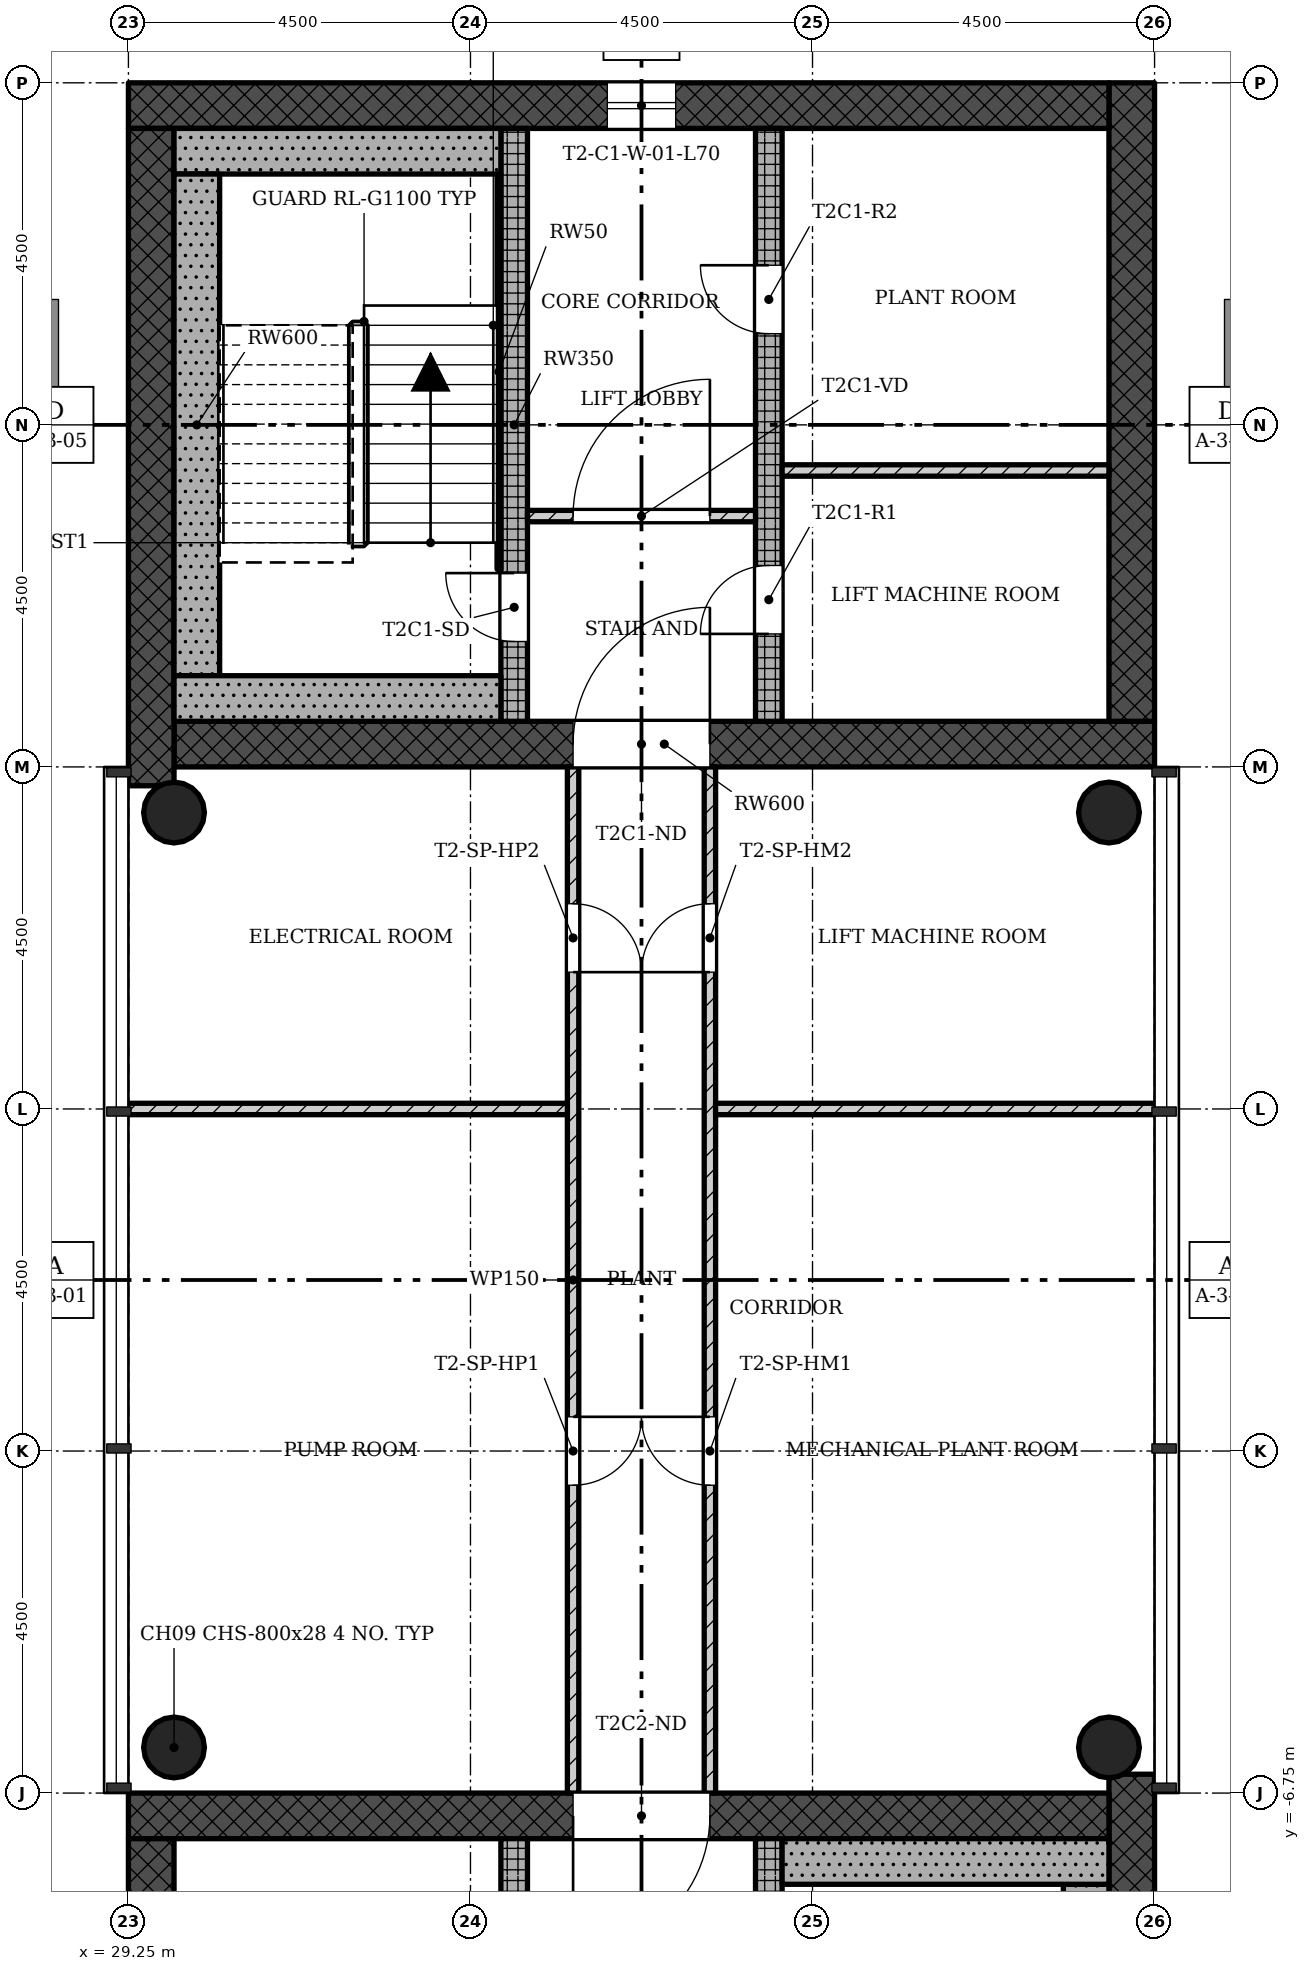
"""IFC4 building model, lengths in metres.
Left out: names, types, materials, properties, quantities, classifications, styles, units other than length and angle.
Written with IfcOpenShell. Run it as: python <this file> out.ifc"""

import sys

from ifc_helpers import new_model, si_unit, direction, frame, frame_2d, origin, origin_2d, place, context, subcontext, project, spatial, rectangle, hollow_circle, extrude, element, fill, save


model = new_model("IFC4")
c1 = context("Model", 3, precision=1e-05, world=origin(), true_north=direction((0.0, 1.0)))
c2 = subcontext(c1, "Body", "Model", "MODEL_VIEW")
j1 = project(units=[si_unit("LENGTHUNIT", "METRE"), si_unit("PLANEANGLEUNIT", "RADIAN")], contexts=[c1])
p1 = place(None, origin())
s1 = spatial("IfcSite", under=j1, at=p1, CompositionType="ELEMENT")
p2 = place(p1, origin())
s2 = spatial("IfcBuilding", under=s1, at=p2, CompositionType="ELEMENT")
p3 = place(p2, frame((0.0, 0.0, 255.9)))
s3 = spatial("IfcBuildingStorey", under=s2, at=p3, CompositionType="ELEMENT", Elevation=255.9)
p4 = place(p3, frame((29.85, 7.05, 0.0), z_axis=(0.0, 0.0, 1.0), x_axis=(1.0, 0.0, 0.0)))
e1 = element("IfcWall", 1, at=p4, inside=s3, PredefinedType="SHEAR", context=c2, shape_type="SweptSolid", body=[
    extrude(rectangle(XDim=12.9, YDim=0.6, at=frame_2d((6.45, 0.0))), origin(), (0.0, 0.0, 1.0), 4.5),
])
p5 = place(p4, frame((5.25, 0.0, 0.0)))
e2 = element("IfcOpeningElement", 2, at=p5, cuts=e1, PredefinedType="OPENING", context=c2, shape_type="SweptSolid", body=[
    extrude(rectangle(XDim=1.8, YDim=2.1, at=frame_2d((0.9, 1.05))), frame((0.0, 0.31, 0.0), z_axis=(0.0, -1.0, 0.0), x_axis=(1.0, 0.0, 0.0)), (0.0, 0.0, 1.0), 0.62),
])
p6 = place(p3, frame((42.45, 7.35, 0.0), z_axis=(0.0, 0.0, 1.0), x_axis=(0.0, 1.0, 0.0)))
e3 = element("IfcWall", 3, at=p6, inside=s3, PredefinedType="SHEAR", context=c2, shape_type="SweptSolid", body=[
    extrude(rectangle(XDim=8.4, YDim=0.6, at=frame_2d((4.2, 0.0))), origin(), (0.0, 0.0, 1.0), 4.5),
])
p7 = place(p3, frame((42.15, 15.45, 0.0), z_axis=(0.0, 0.0, 1.0), x_axis=(-1.0, 0.0, 0.0)))
e4 = element("IfcWall", 4, at=p7, inside=s3, PredefinedType="SHEAR", context=c2, shape_type="SweptSolid", body=[
    extrude(rectangle(XDim=12.9, YDim=0.6, at=frame_2d((6.45, 0.0))), origin(), (0.0, 0.0, 1.0), 4.5),
])
p8 = place(p7, frame((5.7, 0.0, 0.45)))
e5 = element("IfcOpeningElement", 5, at=p8, cuts=e4, PredefinedType="OPENING", context=c2, shape_type="SweptSolid", body=[
    extrude(rectangle(XDim=0.9, YDim=2.4, at=frame_2d((0.45, 1.2))), frame((0.0, 0.31, 0.0), z_axis=(0.0, -1.0, 0.0), x_axis=(1.0, 0.0, 0.0)), (0.0, 0.0, 1.0), 0.62),
])
p9 = place(p3, frame((29.55, 15.15, 0.0), z_axis=(0.0, 0.0, 1.0), x_axis=(0.0, -1.0, 0.0)))
e6 = element("IfcWall", 6, at=p9, inside=s3, PredefinedType="SHEAR", context=c2, shape_type="SweptSolid", body=[
    extrude(rectangle(XDim=8.648, YDim=0.6, at=frame_2d((4.324, 0.0))), origin(), (0.0, 0.0, 1.0), 4.5),
])
p10 = place(p3, frame((34.325, 7.35, 0.0), z_axis=(0.0, 0.0, 1.0), x_axis=(0.0, 1.0, 0.0)))
e7 = element("IfcWall", 7, at=p10, inside=s3, PredefinedType="SHEAR", context=c2, shape_type="SweptSolid", body=[
    extrude(rectangle(XDim=7.8, YDim=0.35, at=frame_2d((3.9, 0.0))), origin(), (0.0, 0.0, 1.0), 4.5),
])
p11 = place(p10, frame((1.05, 0.0, 0.0)))
e8 = element("IfcOpeningElement", 8, at=p11, cuts=e7, PredefinedType="OPENING", context=c2, shape_type="SweptSolid", body=[
    extrude(rectangle(XDim=0.9, YDim=2.1, at=frame_2d((0.45, 1.05))), frame((0.0, 0.185, 0.0), z_axis=(0.0, -1.0, 0.0), x_axis=(1.0, 0.0, 0.0)), (0.0, 0.0, 1.0), 0.37),
])
p12 = place(p3, frame((37.675, 7.35, 0.0), z_axis=(0.0, 0.0, 1.0), x_axis=(0.0, 1.0, 0.0)))
e9 = element("IfcWall", 9, at=p12, inside=s3, PredefinedType="SHEAR", context=c2, shape_type="SweptSolid", body=[
    extrude(rectangle(XDim=7.8, YDim=0.35, at=frame_2d((3.9, 0.0))), origin(), (0.0, 0.0, 1.0), 4.5),
])
p13 = place(p12, frame((1.15, 0.0, 0.0)))
e10 = element("IfcOpeningElement", 10, at=p13, cuts=e9, PredefinedType="OPENING", context=c2, shape_type="SweptSolid", body=[
    extrude(rectangle(XDim=0.9, YDim=2.1, at=frame_2d((0.45, 1.05))), frame((0.0, 0.185, 0.0), z_axis=(0.0, -1.0, 0.0), x_axis=(1.0, 0.0, 0.0)), (0.0, 0.0, 1.0), 0.37),
])
p14 = place(p12, frame((5.1, 0.0, 0.0)))
e11 = element("IfcOpeningElement", 11, at=p14, cuts=e9, PredefinedType="OPENING", context=c2, shape_type="SweptSolid", body=[
    extrude(rectangle(XDim=0.9, YDim=2.1, at=frame_2d((0.45, 1.05))), frame((0.0, 0.185, 0.0), z_axis=(0.0, -1.0, 0.0), x_axis=(1.0, 0.0, 0.0)), (0.0, 0.0, 1.0), 0.37),
])
p15 = place(p3, frame((42.45, -15.15, 0.0), z_axis=(0.0, 0.0, 1.0), x_axis=(0.0, 1.0, 0.0)))
e12 = element("IfcWall", 12, at=p15, inside=s3, PredefinedType="SHEAR", context=c2, shape_type="SweptSolid", body=[
    extrude(rectangle(XDim=8.648, YDim=0.6, at=frame_2d((4.324, 0.0))), origin(), (0.0, 0.0, 1.0), 4.5),
])
p16 = place(p3, frame((42.15, -7.05, 0.0), z_axis=(0.0, 0.0, 1.0), x_axis=(-1.0, 0.0, 0.0)))
e13 = element("IfcWall", 13, at=p16, inside=s3, PredefinedType="SHEAR", context=c2, shape_type="SweptSolid", body=[
    extrude(rectangle(XDim=12.9, YDim=0.6, at=frame_2d((6.45, 0.0))), origin(), (0.0, 0.0, 1.0), 4.5),
])
p17 = place(p16, frame((5.25, 0.0, 0.0)))
e14 = element("IfcOpeningElement", 14, at=p17, cuts=e13, PredefinedType="OPENING", context=c2, shape_type="SweptSolid", body=[
    extrude(rectangle(XDim=1.8, YDim=2.1, at=frame_2d((0.9, 1.05))), frame((0.0, 0.31, 0.0), z_axis=(0.0, -1.0, 0.0), x_axis=(1.0, 0.0, 0.0)), (0.0, 0.0, 1.0), 0.62),
])
p18 = place(p3, frame((29.55, -7.35, 0.0), z_axis=(0.0, 0.0, 1.0), x_axis=(0.0, -1.0, 0.0)))
e15 = element("IfcWall", 15, at=p18, inside=s3, PredefinedType="SHEAR", context=c2, shape_type="SweptSolid", body=[
    extrude(rectangle(XDim=8.4, YDim=0.6, at=frame_2d((4.2, 0.0))), origin(), (0.0, 0.0, 1.0), 4.5),
])
p19 = place(p3, frame((34.325, -15.15, 0.0), z_axis=(0.0, 0.0, 1.0), x_axis=(0.0, 1.0, 0.0)))
e16 = element("IfcWall", 16, at=p19, inside=s3, PredefinedType="SHEAR", context=c2, shape_type="SweptSolid", body=[
    extrude(rectangle(XDim=7.8, YDim=0.35, at=frame_2d((3.9, 0.0))), origin(), (0.0, 0.0, 1.0), 4.5),
])
p20 = place(p19, frame((5.55, 0.0, 0.0)))
e17 = element("IfcOpeningElement", 17, at=p20, cuts=e16, PredefinedType="OPENING", context=c2, shape_type="SweptSolid", body=[
    extrude(rectangle(XDim=1.1, YDim=2.1, at=frame_2d((0.55, 1.05))), frame((0.0, 0.185, 0.0), z_axis=(0.0, -1.0, 0.0), x_axis=(1.0, 0.0, 0.0)), (0.0, 0.0, 1.0), 0.37),
])
p21 = place(p19, frame((3.95, 0.0, 0.0)))
e18 = element("IfcOpeningElement", 18, at=p21, cuts=e16, PredefinedType="OPENING", context=c2, shape_type="SweptSolid", body=[
    extrude(rectangle(XDim=0.9, YDim=2.1, at=frame_2d((0.45, 1.05))), frame((0.0, 0.185, 0.0), z_axis=(0.0, -1.0, 0.0), x_axis=(1.0, 0.0, 0.0)), (0.0, 0.0, 1.0), 0.37),
])
p22 = place(p19, frame((2.75, 0.0, 0.0)))
e19 = element("IfcOpeningElement", 19, at=p22, cuts=e16, PredefinedType="OPENING", context=c2, shape_type="SweptSolid", body=[
    extrude(rectangle(XDim=0.9, YDim=2.1, at=frame_2d((0.45, 1.05))), frame((0.0, 0.185, 0.0), z_axis=(0.0, -1.0, 0.0), x_axis=(1.0, 0.0, 0.0)), (0.0, 0.0, 1.0), 0.37),
])
p23 = place(p19, frame((0.85, 0.0, 0.0)))
e20 = element("IfcOpeningElement", 20, at=p23, cuts=e16, PredefinedType="OPENING", context=c2, shape_type="SweptSolid", body=[
    extrude(rectangle(XDim=0.9, YDim=2.1, at=frame_2d((0.45, 1.05))), frame((0.0, 0.185, 0.0), z_axis=(0.0, -1.0, 0.0), x_axis=(1.0, 0.0, 0.0)), (0.0, 0.0, 1.0), 0.37),
])
p24 = place(p3, frame((37.675, -15.15, 0.0), z_axis=(0.0, 0.0, 1.0), x_axis=(0.0, 1.0, 0.0)))
e21 = element("IfcWall", 21, at=p24, inside=s3, PredefinedType="SHEAR", context=c2, shape_type="SweptSolid", body=[
    extrude(rectangle(XDim=7.8, YDim=0.35, at=frame_2d((3.9, 0.0))), origin(), (0.0, 0.0, 1.0), 4.5),
])
p25 = place(p24, frame((5.85, 0.0, 0.0)))
e22 = element("IfcOpeningElement", 22, at=p25, cuts=e21, PredefinedType="OPENING", context=c2, shape_type="SweptSolid", body=[
    extrude(rectangle(XDim=0.9, YDim=2.1, at=frame_2d((0.45, 1.05))), frame((0.0, 0.185, 0.0), z_axis=(0.0, -1.0, 0.0), x_axis=(1.0, 0.0, 0.0)), (0.0, 0.0, 1.0), 0.37),
])
for number, where, z_axis, x_axis in (
    (23, (42.15, -6.15, 0.0), (0.0, 0.0, 1.0), (1.0, 0.0, 0.0)),
    (24, (42.15, 6.15, 0.0), (0.0, 0.0, 1.0), (1.0, 0.0, 0.0)),
    (25, (29.85, 6.15, 0.0), (0.0, 0.0, 1.0), (1.0, 0.0, 0.0)),
    (26, (29.85, -6.15, 0.0), (0.0, 0.0, 1.0), (1.0, 0.0, 0.0)),
):
    element("IfcColumn", number, at=place(p3, frame(where, z_axis=z_axis, x_axis=x_axis)), inside=s3, PredefinedType="COLUMN", context=c2, shape_type="SweptSolid", body=[
        extrude(hollow_circle(Radius=0.4, WallThickness=0.028, at=origin_2d()), origin(), (0.0, 0.0, 1.0), 4.5),
    ])
p26 = place(p3, frame((37.5, 10.05, 0.0), z_axis=(0.0, 0.0, 1.0), x_axis=(-1.0, 0.0, 0.0)))
e27 = element("IfcWall", 27, at=p26, inside=s3, PredefinedType="PARTITIONING", context=c2, shape_type="SweptSolid", body=[
    extrude(rectangle(XDim=3.0, YDim=0.15, at=frame_2d((1.5, 0.0))), origin(), (0.0, 0.0, 1.0), 4.1),
])
p27 = place(p26, frame((0.6, 0.0, 0.0)))
e28 = element("IfcOpeningElement", 28, at=p27, cuts=e27, PredefinedType="OPENING", context=c2, shape_type="SweptSolid", body=[
    extrude(rectangle(XDim=1.8, YDim=2.1, at=frame_2d((0.9, 1.05))), frame((0.0, 0.085, 0.0), z_axis=(0.0, -1.0, 0.0), x_axis=(1.0, 0.0, 0.0)), (0.0, 0.0, 1.0), 0.17),
])
p28 = place(p3, frame((42.15, 10.65, 0.0), z_axis=(0.0, 0.0, 1.0), x_axis=(-1.0, 0.0, 0.0)))
e29 = element("IfcWall", 29, at=p28, inside=s3, PredefinedType="PARTITIONING", context=c2, shape_type="SweptSolid", body=[
    extrude(rectangle(XDim=4.3, YDim=0.15, at=frame_2d((2.15, 0.0))), origin(), (0.0, 0.0, 1.0), 4.1),
])
p29 = place(p3, frame((35.1, -6.75, 0.0), z_axis=(0.0, 0.0, 1.0), x_axis=(0.0, 1.0, 0.0)))
e30 = element("IfcWall", 30, at=p29, inside=s3, PredefinedType="PARTITIONING", context=c2, shape_type="SweptSolid", body=[
    extrude(rectangle(XDim=13.5, YDim=0.15, at=frame_2d((6.75, 0.0))), origin(), (0.0, 0.0, 1.0), 4.1),
])
p30 = place(p29, frame((4.05, 0.0, 0.0)))
e31 = element("IfcOpeningElement", 31, at=p30, cuts=e30, PredefinedType="OPENING", context=c2, shape_type="SweptSolid", body=[
    extrude(rectangle(XDim=0.9, YDim=2.1, at=frame_2d((0.45, 1.05))), frame((0.0, 0.085, 0.0), z_axis=(0.0, -1.0, 0.0), x_axis=(1.0, 0.0, 0.0)), (0.0, 0.0, 1.0), 0.17),
])
p31 = place(p29, frame((10.8, 0.0, 0.0)))
e32 = element("IfcOpeningElement", 32, at=p31, cuts=e30, PredefinedType="OPENING", context=c2, shape_type="SweptSolid", body=[
    extrude(rectangle(XDim=0.9, YDim=2.1, at=frame_2d((0.45, 1.05))), frame((0.0, 0.085, 0.0), z_axis=(0.0, -1.0, 0.0), x_axis=(1.0, 0.0, 0.0)), (0.0, 0.0, 1.0), 0.17),
])
p32 = place(p3, frame((35.025, 2.25, 0.0), z_axis=(0.0, 0.0, 1.0), x_axis=(-1.0, 0.0, 0.0)))
e33 = element("IfcWall", 33, at=p32, inside=s3, PredefinedType="PARTITIONING", context=c2, shape_type="SweptSolid", body=[
    extrude(rectangle(XDim=5.875, YDim=0.15, at=frame_2d((2.938, 0.0))), origin(), (0.0, 0.0, 1.0), 4.1),
])
p33 = place(p3, frame((36.9, -6.75, 0.0), z_axis=(0.0, 0.0, 1.0), x_axis=(0.0, 1.0, 0.0)))
e34 = element("IfcWall", 34, at=p33, inside=s3, PredefinedType="PARTITIONING", context=c2, shape_type="SweptSolid", body=[
    extrude(rectangle(XDim=13.5, YDim=0.15, at=frame_2d((6.75, 0.0))), origin(), (0.0, 0.0, 1.0), 4.1),
])
p34 = place(p33, frame((4.05, 0.0, 0.0)))
e35 = element("IfcOpeningElement", 35, at=p34, cuts=e34, PredefinedType="OPENING", context=c2, shape_type="SweptSolid", body=[
    extrude(rectangle(XDim=0.9, YDim=2.1, at=frame_2d((0.45, 1.05))), frame((0.0, 0.085, 0.0), z_axis=(0.0, -1.0, 0.0), x_axis=(1.0, 0.0, 0.0)), (0.0, 0.0, 1.0), 0.17),
])
p35 = place(p33, frame((10.8, 0.0, 0.0)))
e36 = element("IfcOpeningElement", 36, at=p35, cuts=e34, PredefinedType="OPENING", context=c2, shape_type="SweptSolid", body=[
    extrude(rectangle(XDim=0.9, YDim=2.1, at=frame_2d((0.45, 1.05))), frame((0.0, 0.085, 0.0), z_axis=(0.0, -1.0, 0.0), x_axis=(1.0, 0.0, 0.0)), (0.0, 0.0, 1.0), 0.17),
])
p36 = place(p3, frame((36.975, 2.25, 0.0), z_axis=(0.0, 0.0, 1.0), x_axis=(1.0, 0.0, 0.0)))
e37 = element("IfcWall", 37, at=p36, inside=s3, PredefinedType="PARTITIONING", context=c2, shape_type="SweptSolid", body=[
    extrude(rectangle(XDim=5.875, YDim=0.15, at=frame_2d((2.938, 0.0))), origin(), (0.0, 0.0, 1.0), 4.1),
])
p37 = place(p3, frame((34.15, 14.85, 0.0), z_axis=(0.0, 0.0, 1.0), x_axis=(-1.0, 0.0, 0.0)))
e38 = element("IfcWall", 38, at=p37, inside=s3, PredefinedType="SHEAR", context=c2, shape_type="SweptSolid", body=[
    extrude(rectangle(XDim=4.3, YDim=0.6, at=frame_2d((2.15, 0.0))), origin(), (0.0, 0.0, 1.0), 4.5),
])
p38 = place(p3, frame((30.15, 7.95, 0.0), z_axis=(0.0, 0.0, 1.0), x_axis=(0.0, 1.0, 0.0)))
e39 = element("IfcWall", 39, at=p38, inside=s3, PredefinedType="SHEAR", context=c2, shape_type="SweptSolid", body=[
    extrude(rectangle(XDim=6.6, YDim=0.6, at=frame_2d((3.3, 0.0))), origin(), (0.0, 0.0, 1.0), 4.5),
])
p39 = place(p3, frame((34.15, 7.65, 0.0), z_axis=(0.0, 0.0, 1.0), x_axis=(-1.0, 0.0, 0.0)))
e40 = element("IfcWall", 40, at=p39, inside=s3, PredefinedType="SHEAR", context=c2, shape_type="SweptSolid", body=[
    extrude(rectangle(XDim=4.3, YDim=0.6, at=frame_2d((2.15, 0.0))), origin(), (0.0, 0.0, 1.0), 4.5),
])
p40 = place(p3, frame((34.125, 9.35, 0.0), z_axis=(0.0, 0.0, 1.0), x_axis=(0.0, 1.0, 0.0)))
e41 = element("IfcWall", 41, at=p40, inside=s3, PredefinedType="SHEAR", context=c2, shape_type="SweptSolid", body=[
    extrude(rectangle(XDim=5.2, YDim=0.05, at=frame_2d((2.6, 0.0))), origin(), (0.0, 0.0, 1.0), 4.5),
])
p41 = place(p3, frame((41.85, -7.95, 0.0), z_axis=(0.0, 0.0, 1.0), x_axis=(0.0, -1.0, 0.0)))
e42 = element("IfcWall", 42, at=p41, inside=s3, PredefinedType="SHEAR", context=c2, shape_type="SweptSolid", body=[
    extrude(rectangle(XDim=6.6, YDim=0.6, at=frame_2d((3.3, 0.0))), origin(), (0.0, 0.0, 1.0), 4.5),
])
p42 = place(p3, frame((37.85, -7.65, 0.0), z_axis=(0.0, 0.0, 1.0), x_axis=(1.0, 0.0, 0.0)))
e43 = element("IfcWall", 43, at=p42, inside=s3, PredefinedType="SHEAR", context=c2, shape_type="SweptSolid", body=[
    extrude(rectangle(XDim=4.3, YDim=0.6, at=frame_2d((2.15, 0.0))), origin(), (0.0, 0.0, 1.0), 4.5),
])
p43 = place(p8, origin())
e44 = element("IfcWindow", 44, at=p43, inside=s3, PartitioningType="SINGLE_PANEL", PredefinedType="WINDOW", context=c2, shape_type="SweptSolid", body=[
    extrude(rectangle(XDim=0.9, YDim=2.4, at=frame_2d((0.45, 1.2))), frame((0.0, 0.03, 0.0), z_axis=(0.0, -1.0, 0.0), x_axis=(1.0, 0.0, 0.0)), (0.0, 0.0, 1.0), 0.06),
])
fill(e5, e44)
p44 = place(p27, origin())
e45 = element("IfcDoor", 45, at=p44, inside=s3, OperationType="SINGLE_SWING_LEFT", PredefinedType="DOOR", context=c2, shape_type="SweptSolid", body=[
    extrude(rectangle(XDim=1.8, YDim=2.1, at=frame_2d((0.9, 1.05))), frame((0.0, 0.025, 0.0), z_axis=(0.0, -1.0, 0.0), x_axis=(1.0, 0.0, 0.0)), (0.0, 0.0, 1.0), 0.05),
])
fill(e28, e45)
p45 = place(p30, origin())
e46 = element("IfcDoor", 46, at=p45, inside=s3, OperationType="SINGLE_SWING_RIGHT", PredefinedType="DOOR", context=c2, shape_type="SweptSolid", body=[
    extrude(rectangle(XDim=0.9, YDim=2.1, at=frame_2d((0.45, 1.05))), frame((0.0, 0.025, 0.0), z_axis=(0.0, -1.0, 0.0), x_axis=(1.0, 0.0, 0.0)), (0.0, 0.0, 1.0), 0.05),
])
fill(e31, e46)
p46 = place(p31, origin())
e47 = element("IfcDoor", 47, at=p46, inside=s3, OperationType="SINGLE_SWING_LEFT", PredefinedType="DOOR", context=c2, shape_type="SweptSolid", body=[
    extrude(rectangle(XDim=0.9, YDim=2.1, at=frame_2d((0.45, 1.05))), frame((0.0, 0.025, 0.0), z_axis=(0.0, -1.0, 0.0), x_axis=(1.0, 0.0, 0.0)), (0.0, 0.0, 1.0), 0.05),
])
fill(e32, e47)
p47 = place(p34, origin())
e48 = element("IfcDoor", 48, at=p47, inside=s3, OperationType="SINGLE_SWING_LEFT", PredefinedType="DOOR", context=c2, shape_type="SweptSolid", body=[
    extrude(rectangle(XDim=0.9, YDim=2.1, at=frame_2d((0.45, 1.05))), frame((0.0, 0.025, 0.0), z_axis=(0.0, -1.0, 0.0), x_axis=(1.0, 0.0, 0.0)), (0.0, 0.0, 1.0), 0.05),
])
fill(e35, e48)
p48 = place(p35, origin())
e49 = element("IfcDoor", 49, at=p48, inside=s3, OperationType="SINGLE_SWING_RIGHT", PredefinedType="DOOR", context=c2, shape_type="SweptSolid", body=[
    extrude(rectangle(XDim=0.9, YDim=2.1, at=frame_2d((0.45, 1.05))), frame((0.0, 0.025, 0.0), z_axis=(0.0, -1.0, 0.0), x_axis=(1.0, 0.0, 0.0)), (0.0, 0.0, 1.0), 0.05),
])
fill(e36, e49)
p49 = place(p11, origin())
e50 = element("IfcDoor", 50, at=p49, inside=s3, OperationType="SINGLE_SWING_LEFT", PredefinedType="DOOR", context=c2, shape_type="SweptSolid", body=[
    extrude(rectangle(XDim=0.9, YDim=2.1, at=frame_2d((0.45, 1.05))), frame((0.0, 0.025, 0.0), z_axis=(0.0, -1.0, 0.0), x_axis=(1.0, 0.0, 0.0)), (0.0, 0.0, 1.0), 0.05),
])
fill(e8, e50)
p50 = place(p13, origin())
e51 = element("IfcDoor", 51, at=p50, inside=s3, OperationType="SINGLE_SWING_RIGHT", PredefinedType="DOOR", context=c2, shape_type="SweptSolid", body=[
    extrude(rectangle(XDim=0.9, YDim=2.1, at=frame_2d((0.45, 1.05))), frame((0.0, 0.025, 0.0), z_axis=(0.0, -1.0, 0.0), x_axis=(1.0, 0.0, 0.0)), (0.0, 0.0, 1.0), 0.05),
])
fill(e10, e51)
p51 = place(p14, origin())
e52 = element("IfcDoor", 52, at=p51, inside=s3, OperationType="SINGLE_SWING_LEFT", PredefinedType="DOOR", context=c2, shape_type="SweptSolid", body=[
    extrude(rectangle(XDim=0.9, YDim=2.1, at=frame_2d((0.45, 1.05))), frame((0.0, 0.025, 0.0), z_axis=(0.0, -1.0, 0.0), x_axis=(1.0, 0.0, 0.0)), (0.0, 0.0, 1.0), 0.05),
])
fill(e11, e52)
p52 = place(p5, origin())
e53 = element("IfcDoor", 53, at=p52, inside=s3, OperationType="SINGLE_SWING_LEFT", PredefinedType="DOOR", context=c2, shape_type="SweptSolid", body=[
    extrude(rectangle(XDim=1.8, YDim=2.1, at=frame_2d((0.9, 1.05))), frame((0.0, 0.025, 0.0), z_axis=(0.0, -1.0, 0.0), x_axis=(1.0, 0.0, 0.0)), (0.0, 0.0, 1.0), 0.05),
])
fill(e2, e53)
p53 = place(p17, origin())
e54 = element("IfcDoor", 54, at=p53, inside=s3, OperationType="SINGLE_SWING_LEFT", PredefinedType="DOOR", context=c2, shape_type="SweptSolid", body=[
    extrude(rectangle(XDim=1.8, YDim=2.1, at=frame_2d((0.9, 1.05))), frame((0.0, 0.025, 0.0), z_axis=(0.0, -1.0, 0.0), x_axis=(1.0, 0.0, 0.0)), (0.0, 0.0, 1.0), 0.05),
])
fill(e14, e54)
save(model, sys.argv[1])
